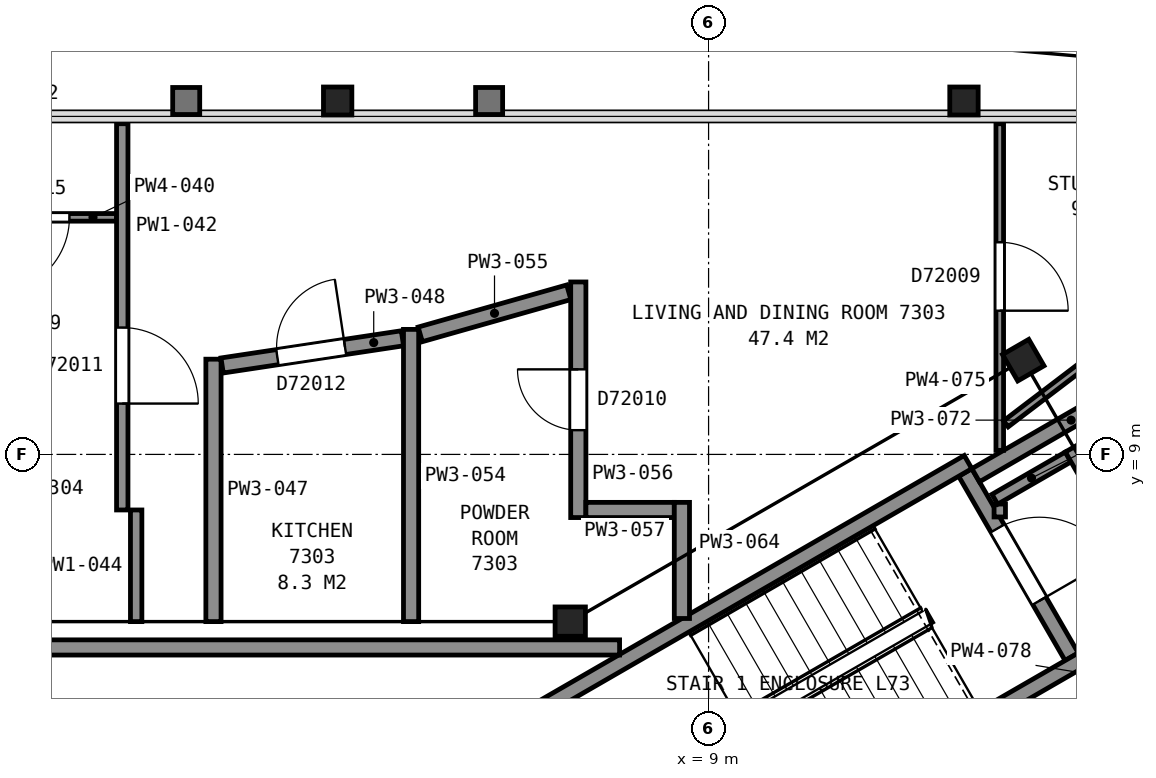
"""IFC4 building model, lengths in metres.
Left out: names, types, materials, properties, quantities, classifications, styles, units other than length and angle.
Written with IfcOpenShell. Run it as: python <this file> out.ifc"""

import sys

from ifc_helpers import new_model, si_unit, direction, frame, frame_2d, origin, origin_2d, place, context, subcontext, project, spatial, rectangle, i_section, extrude, element, fill, save


model = new_model("IFC4")
c1 = context("Model", 3, precision=1e-05, world=origin(), true_north=direction((0.0, 1.0)))
c2 = subcontext(c1, "Body", "Model", "MODEL_VIEW")
j1 = project(units=[si_unit("LENGTHUNIT", "METRE"), si_unit("PLANEANGLEUNIT", "RADIAN")], contexts=[c1])
p1 = place(None, origin())
s1 = spatial("IfcSite", under=j1, at=p1, CompositionType="ELEMENT")
p2 = place(p1, origin())
s2 = spatial("IfcBuilding", under=s1, at=p2, CompositionType="ELEMENT")
p3 = place(p2, frame((0.0, 0.0, 289.9)))
s3 = spatial("IfcBuildingStorey", under=s2, at=p3, CompositionType="ELEMENT", Elevation=289.9)
for number, where, z_axis, x_axis in (
    (1, (12.36, 13.65, 0.0), (0.0, 0.0, 1.0), (1.0, 0.0, 0.0)),
    (2, (4.12, 13.65, 0.0), (0.0, 0.0, 1.0), (1.0, 0.0, 0.0)),
):
    element("IfcColumn", number, at=place(p3, frame(where, z_axis=z_axis, x_axis=x_axis)), inside=s3, PredefinedType="COLUMN", context=c2, shape_type="SweptSolid", body=[
        extrude(i_section(OverallWidth=0.373, OverallDepth=0.368, WebThickness=0.015, FlangeThickness=0.024, FilletRadius=0.015, at=origin_2d()), origin(), (0.0, 0.0, 1.0), 3.7),
    ])
p4 = place(p3, frame((13.14, 10.24, 0.0), z_axis=(0.0, 0.0, 1.0), x_axis=(0.5, -0.866025403784, 0.0)))
e3 = element("IfcColumn", 3, at=p4, inside=s3, PredefinedType="COLUMN", context=c2, shape_type="SweptSolid", body=[
    extrude(i_section(OverallWidth=0.401, OverallDepth=0.399, WebThickness=0.025, FlangeThickness=0.04, FilletRadius=0.015, at=origin_2d()), origin(), (0.0, 0.0, 1.0), 3.7),
])
p5 = place(p3, frame((7.18, 6.8, 0.0), z_axis=(0.0, 0.0, 1.0), x_axis=(1.0, 0.0, 0.0)))
e4 = element("IfcColumn", 4, at=p5, inside=s3, PredefinedType="COLUMN", context=c2, shape_type="SweptSolid", body=[
    extrude(i_section(OverallWidth=0.399, OverallDepth=0.386, WebThickness=0.021, FlangeThickness=0.033, FilletRadius=0.015, at=origin_2d()), origin(), (0.0, 0.0, 1.0), 3.7),
])
p6 = place(p3, frame((13.777, 6.338, 0.0), z_axis=(0.0, 0.0, 1.0), x_axis=(-0.500049511043, 0.865996816683, 0.0)))
e5 = element("IfcWall", 5, at=p6, inside=s3, PredefinedType="PARTITIONING", context=c2, shape_type="SweptSolid", body=[
    extrude(rectangle(XDim=2.8, YDim=0.2, at=frame_2d((1.4, 0.0))), origin(), (0.0, 0.0, 1.0), 3.45),
])
p7 = place(p6, frame((0.85, 0.0, 0.0)))
e6 = element("IfcOpeningElement", 6, at=p7, cuts=e5, PredefinedType="OPENING", context=c2, shape_type="SweptSolid", body=[
    extrude(rectangle(XDim=1.1, YDim=2.1, at=frame_2d((0.55, 1.05))), frame((0.0, 0.11, 0.0), z_axis=(0.0, -1.0, 0.0), x_axis=(1.0, 0.0, 0.0)), (0.0, 0.0, 1.0), 0.22),
])
for number, where, z_axis, x_axis in (
    (7, (6.178, 5.299, 0.0), (0.0, 0.0, 1.0), (0.866, 0.5, 0.0)),
    (8, (7.678, 2.701, 0.0), (0.0, 0.0, 1.0), (0.866, 0.5, 0.0)),
):
    element("IfcWall", number, at=place(p3, frame(where, z_axis=z_axis, x_axis=x_axis)), inside=s3, PredefinedType="PARTITIONING", context=c2, shape_type="SweptSolid", body=[
        extrude(rectangle(XDim=7.2, YDim=0.2, at=frame_2d((3.6, 0.0))), origin(), (0.0, 0.0, 1.0), 3.45),
    ])
p8 = place(p3, frame((7.829, 6.46, 0.0), z_axis=(0.0, 0.0, 1.0), x_axis=(-1.0, 0.0, 0.0)))
e9 = element("IfcWall", 9, at=p8, inside=s3, PredefinedType="PARTITIONING", context=c2, shape_type="SweptSolid", body=[
    extrude(rectangle(XDim=15.658, YDim=0.2, at=frame_2d((7.829, 0.0))), origin(), (0.0, 0.0, 1.0), 3.45),
])
p9 = place(p8, frame((12.168, 0.0, 0.0)))
e10 = element("IfcOpeningElement", 10, at=p9, cuts=e9, PredefinedType="OPENING", context=c2, shape_type="SweptSolid", body=[
    extrude(rectangle(XDim=1.2, YDim=2.1, at=frame_2d((0.6, 1.05))), frame((0.0, 0.11, 0.0), z_axis=(0.0, -1.0, 0.0), x_axis=(1.0, 0.0, 0.0)), (0.0, 0.0, 1.0), 0.22),
])
p10 = place(p3, frame((-1.014, 12.119, 0.0), z_axis=(0.0, 0.0, 1.0), x_axis=(1.0, 0.0, 0.0)))
e11 = element("IfcWall", 11, at=p10, inside=s3, PredefinedType="PARTITIONING", context=c2, shape_type="SweptSolid", body=[
    extrude(rectangle(XDim=2.225, YDim=0.1, at=frame_2d((1.112, 0.0))), origin(), (0.0, 0.0, 1.0), 2.723),
])
p11 = place(p10, frame((0.605, 0.0, 0.0)))
e12 = element("IfcOpeningElement", 12, at=p11, cuts=e11, PredefinedType="OPENING", context=c2, shape_type="SweptSolid", body=[
    extrude(rectangle(XDim=1.0, YDim=2.1, at=frame_2d((0.5, 1.05))), frame((0.0, 0.06, 0.0), z_axis=(0.0, -1.0, 0.0), x_axis=(1.0, 0.0, 0.0)), (0.0, 0.0, 1.0), 0.12),
])
p12 = place(p3, frame((1.286, 13.351, 0.0), z_axis=(0.0, 0.0, 1.0), x_axis=(0.0, -1.0, 0.0)))
e13 = element("IfcWall", 13, at=p12, inside=s3, PredefinedType="PARTITIONING", context=c2, shape_type="SweptSolid", body=[
    extrude(rectangle(XDim=5.082, YDim=0.15, at=frame_2d((2.541, 0.0))), origin(), (0.0, 0.0, 1.0), 2.723),
])
p13 = place(p12, frame((2.682, 0.0, 0.0)))
e14 = element("IfcOpeningElement", 14, at=p13, cuts=e13, PredefinedType="OPENING", context=c2, shape_type="SweptSolid", body=[
    extrude(rectangle(XDim=1.0, YDim=2.1, at=frame_2d((0.5, 1.05))), frame((0.0, 0.085, 0.0), z_axis=(0.0, -1.0, 0.0), x_axis=(1.0, 0.0, 0.0)), (0.0, 0.0, 1.0), 0.17),
])
p14 = place(p3, frame((1.469, 6.8, 0.0), z_axis=(0.0, 0.0, 1.0), x_axis=(0.0, 1.0, 0.0)))
e15 = element("IfcWall", 15, at=p14, inside=s3, PredefinedType="PARTITIONING", context=c2, shape_type="SweptSolid", body=[
    extrude(rectangle(XDim=1.469, YDim=0.15, at=frame_2d((0.734, 0.0))), origin(), (0.0, 0.0, 1.0), 2.723),
])
p15 = place(p3, frame((2.486, 6.8, 0.0), z_axis=(0.0, 0.0, 1.0), x_axis=(0.0, 1.0, 0.0)))
e16 = element("IfcWall", 16, at=p15, inside=s3, PredefinedType="PARTITIONING", context=c2, shape_type="SweptSolid", body=[
    extrude(rectangle(XDim=3.453, YDim=0.2, at=frame_2d((1.727, 0.0))), origin(), (0.0, 0.0, 1.0), 2.723),
])
p16 = place(p3, frame((4.972, 10.528, 0.0), z_axis=(0.0, 0.0, 1.0), x_axis=(-0.988827119235, -0.149066858374, 0.0)))
e17 = element("IfcWall", 17, at=p16, inside=s3, PredefinedType="PARTITIONING", context=c2, shape_type="SweptSolid", body=[
    extrude(rectangle(XDim=2.399, YDim=0.2, at=frame_2d((1.2, 0.0))), origin(), (0.0, 0.0, 1.0), 2.723),
])
p17 = place(p16, frame((0.764, 0.0, 0.0)))
e18 = element("IfcOpeningElement", 18, at=p17, cuts=e17, PredefinedType="OPENING", context=c2, shape_type="SweptSolid", body=[
    extrude(rectangle(XDim=0.9, YDim=2.1, at=frame_2d((0.45, 1.05))), frame((0.0, 0.11, 0.0), z_axis=(0.0, -1.0, 0.0), x_axis=(1.0, 0.0, 0.0)), (0.0, 0.0, 1.0), 0.22),
])
p18 = place(p3, frame((5.086, 6.8, 0.0), z_axis=(0.0, 0.0, 1.0), x_axis=(0.0, 1.0, 0.0)))
e19 = element("IfcWall", 19, at=p18, inside=s3, PredefinedType="PARTITIONING", context=c2, shape_type="SweptSolid", body=[
    extrude(rectangle(XDim=3.845, YDim=0.2, at=frame_2d((1.922, 0.0))), origin(), (0.0, 0.0, 1.0), 2.723),
])
p19 = place(p3, frame((5.206, 10.579, 0.0), z_axis=(0.0, 0.0, 1.0), x_axis=(0.962043687615, 0.272895480212, 0.0)))
e20 = element("IfcWall", 20, at=p19, inside=s3, PredefinedType="PARTITIONING", context=c2, shape_type="SweptSolid", body=[
    extrude(rectangle(XDim=2.032, YDim=0.2, at=frame_2d((1.016, 0.0))), origin(), (0.0, 0.0, 1.0), 2.723),
])
p20 = place(p3, frame((7.286, 8.169, 0.0), z_axis=(0.0, 0.0, 1.0), x_axis=(0.0, 1.0, 0.0)))
e21 = element("IfcWall", 21, at=p20, inside=s3, PredefinedType="PARTITIONING", context=c2, shape_type="SweptSolid", body=[
    extrude(rectangle(XDim=3.1, YDim=0.2, at=frame_2d((1.55, 0.0))), origin(), (0.0, 0.0, 1.0), 2.723),
])
p21 = place(p20, frame((1.15, 0.0, 0.0)))
e22 = element("IfcOpeningElement", 22, at=p21, cuts=e21, PredefinedType="OPENING", context=c2, shape_type="SweptSolid", body=[
    extrude(rectangle(XDim=0.8, YDim=2.1, at=frame_2d((0.4, 1.05))), frame((0.0, 0.11, 0.0), z_axis=(0.0, -1.0, 0.0), x_axis=(1.0, 0.0, 0.0)), (0.0, 0.0, 1.0), 0.22),
])
p22 = place(p3, frame((7.386, 8.269, 0.0), z_axis=(0.0, 0.0, 1.0), x_axis=(1.0, 0.0, 0.0)))
e23 = element("IfcWall", 23, at=p22, inside=s3, PredefinedType="PARTITIONING", context=c2, shape_type="SweptSolid", body=[
    extrude(rectangle(XDim=1.163, YDim=0.2, at=frame_2d((0.582, 0.0))), origin(), (0.0, 0.0, 1.0), 2.723),
])
p23 = place(p3, frame((8.649, 6.841, 0.0), z_axis=(0.0, 0.0, 1.0), x_axis=(0.0, 1.0, 0.0)))
e24 = element("IfcWall", 24, at=p23, inside=s3, PredefinedType="PARTITIONING", context=c2, shape_type="SweptSolid", body=[
    extrude(rectangle(XDim=1.528, YDim=0.2, at=frame_2d((0.764, 0.0))), origin(), (0.0, 0.0, 1.0), 2.723),
])
p24 = place(p3, frame((12.514, 8.726, 0.0), z_axis=(0.0, 0.0, 1.0), x_axis=(0.865969617579, 0.500096612097, 0.0)))
e25 = element("IfcWall", 25, at=p24, inside=s3, PredefinedType="PARTITIONING", context=c2, shape_type="SweptSolid", body=[
    extrude(rectangle(XDim=2.899, YDim=0.2, at=frame_2d((1.45, 0.0))), origin(), (0.0, 0.0, 1.0), 2.723),
])
p25 = place(p3, frame((12.831, 8.177, 0.0), z_axis=(0.0, 0.0, 1.0), x_axis=(0.0, 1.0, 0.0)))
e26 = element("IfcWall", 26, at=p25, inside=s3, PredefinedType="PARTITIONING", context=c2, shape_type="SweptSolid", body=[
    extrude(rectangle(XDim=0.17, YDim=0.15, at=frame_2d((0.085, 0.0))), origin(), (0.0, 0.0, 1.0), 2.723),
])
p26 = place(p3, frame((12.766, 8.409, 0.0), z_axis=(0.0, 0.0, 1.0), x_axis=(0.865995823051, 0.500051231833, 0.0)))
e27 = element("IfcWall", 27, at=p26, inside=s3, PredefinedType="PARTITIONING", context=c2, shape_type="SweptSolid", body=[
    extrude(rectangle(XDim=1.114, YDim=0.15, at=frame_2d((0.557, 0.0))), origin(), (0.0, 0.0, 1.0), 2.723),
])
p27 = place(p3, frame((12.831, 13.351, 0.0), z_axis=(0.0, 0.0, 1.0), x_axis=(0.0, -1.0, 0.0)))
e28 = element("IfcWall", 28, at=p27, inside=s3, PredefinedType="PARTITIONING", context=c2, shape_type="SweptSolid", body=[
    extrude(rectangle(XDim=4.298, YDim=0.1, at=frame_2d((2.149, 0.0))), origin(), (0.0, 0.0, 1.0), 2.723),
])
p28 = place(p27, frame((1.56, 0.0, 0.0)))
e29 = element("IfcOpeningElement", 29, at=p28, cuts=e28, PredefinedType="OPENING", context=c2, shape_type="SweptSolid", body=[
    extrude(rectangle(XDim=0.9, YDim=2.1, at=frame_2d((0.45, 1.05))), frame((0.0, 0.06, 0.0), z_axis=(0.0, -1.0, 0.0), x_axis=(1.0, 0.0, 0.0)), (0.0, 0.0, 1.0), 0.12),
])
p29 = place(p3, frame((18.144, 13.383, 0.0), z_axis=(0.0, 0.0, 1.0), x_axis=(-0.795867985115, -0.605470189414, 0.0)))
e30 = element("IfcWall", 30, at=p29, inside=s3, PredefinedType="PARTITIONING", context=c2, shape_type="SweptSolid", body=[
    extrude(rectangle(XDim=6.574, YDim=0.1, at=frame_2d((3.287, 0.0))), origin(), (0.0, 0.0, 1.0), 2.723),
])
p30 = place(p29, frame((2.925, 0.0, 0.0)))
e31 = element("IfcOpeningElement", 31, at=p30, cuts=e30, PredefinedType="OPENING", context=c2, shape_type="SweptSolid", body=[
    extrude(rectangle(XDim=1.0, YDim=2.1, at=frame_2d((0.5, 1.05))), frame((0.0, 0.06, 0.0), z_axis=(0.0, -1.0, 0.0), x_axis=(1.0, 0.0, 0.0)), (0.0, 0.0, 1.0), 0.12),
])
p31 = place(p3, frame((13.759, 9.069, 0.0), z_axis=(0.0, 0.0, 1.0), x_axis=(0.500020344131, -0.866013657776, 0.0)))
e32 = element("IfcWall", 32, at=p31, inside=s3, PredefinedType="PARTITIONING", context=c2, shape_type="SweptSolid", body=[
    extrude(rectangle(XDim=2.625, YDim=0.15, at=frame_2d((1.312, 0.0))), origin(), (0.0, 0.0, 1.0), 2.723),
])
p32 = place(p7, origin())
e33 = element("IfcDoor", 33, at=p32, inside=s3, OperationType="SINGLE_SWING_LEFT", PredefinedType="DOOR", context=c2, shape_type="SweptSolid", body=[
    extrude(rectangle(XDim=1.1, YDim=2.1, at=frame_2d((0.55, 1.05))), frame((0.0, 0.025, 0.0), z_axis=(0.0, -1.0, 0.0), x_axis=(1.0, 0.0, 0.0)), (0.0, 0.0, 1.0), 0.05),
])
fill(e6, e33)
p33 = place(p11, origin())
e34 = element("IfcDoor", 34, at=p33, inside=s3, OperationType="SINGLE_SWING_LEFT", PredefinedType="DOOR", context=c2, shape_type="SweptSolid", body=[
    extrude(rectangle(XDim=1.0, YDim=2.1, at=frame_2d((0.5, 1.05))), frame((0.0, 0.025, 0.0), z_axis=(0.0, -1.0, 0.0), x_axis=(1.0, 0.0, 0.0)), (0.0, 0.0, 1.0), 0.05),
])
fill(e12, e34)
p34 = place(p13, origin())
e35 = element("IfcDoor", 35, at=p34, inside=s3, OperationType="SINGLE_SWING_RIGHT", PredefinedType="DOOR", context=c2, shape_type="SweptSolid", body=[
    extrude(rectangle(XDim=1.0, YDim=2.1, at=frame_2d((0.5, 1.05))), frame((0.0, 0.025, 0.0), z_axis=(0.0, -1.0, 0.0), x_axis=(1.0, 0.0, 0.0)), (0.0, 0.0, 1.0), 0.05),
])
fill(e14, e35)
p35 = place(p17, origin())
e36 = element("IfcDoor", 36, at=p35, inside=s3, OperationType="SINGLE_SWING_LEFT", PredefinedType="DOOR", context=c2, shape_type="SweptSolid", body=[
    extrude(rectangle(XDim=0.9, YDim=2.1, at=frame_2d((0.45, 1.05))), frame((0.0, 0.025, 0.0), z_axis=(0.0, -1.0, 0.0), x_axis=(1.0, 0.0, 0.0)), (0.0, 0.0, 1.0), 0.05),
])
fill(e18, e36)
p36 = place(p21, origin())
e37 = element("IfcDoor", 37, at=p36, inside=s3, OperationType="SINGLE_SWING_RIGHT", PredefinedType="DOOR", context=c2, shape_type="SweptSolid", body=[
    extrude(rectangle(XDim=0.8, YDim=2.1, at=frame_2d((0.4, 1.05))), frame((0.0, 0.025, 0.0), z_axis=(0.0, -1.0, 0.0), x_axis=(1.0, 0.0, 0.0)), (0.0, 0.0, 1.0), 0.05),
])
fill(e22, e37)
p37 = place(p28, origin())
e38 = element("IfcDoor", 38, at=p37, inside=s3, OperationType="SINGLE_SWING_RIGHT", PredefinedType="DOOR", context=c2, shape_type="SweptSolid", body=[
    extrude(rectangle(XDim=0.9, YDim=2.1, at=frame_2d((0.45, 1.05))), frame((0.0, 0.025, 0.0), z_axis=(0.0, -1.0, 0.0), x_axis=(1.0, 0.0, 0.0)), (0.0, 0.0, 1.0), 0.05),
])
fill(e29, e38)
save(model, sys.argv[1])
